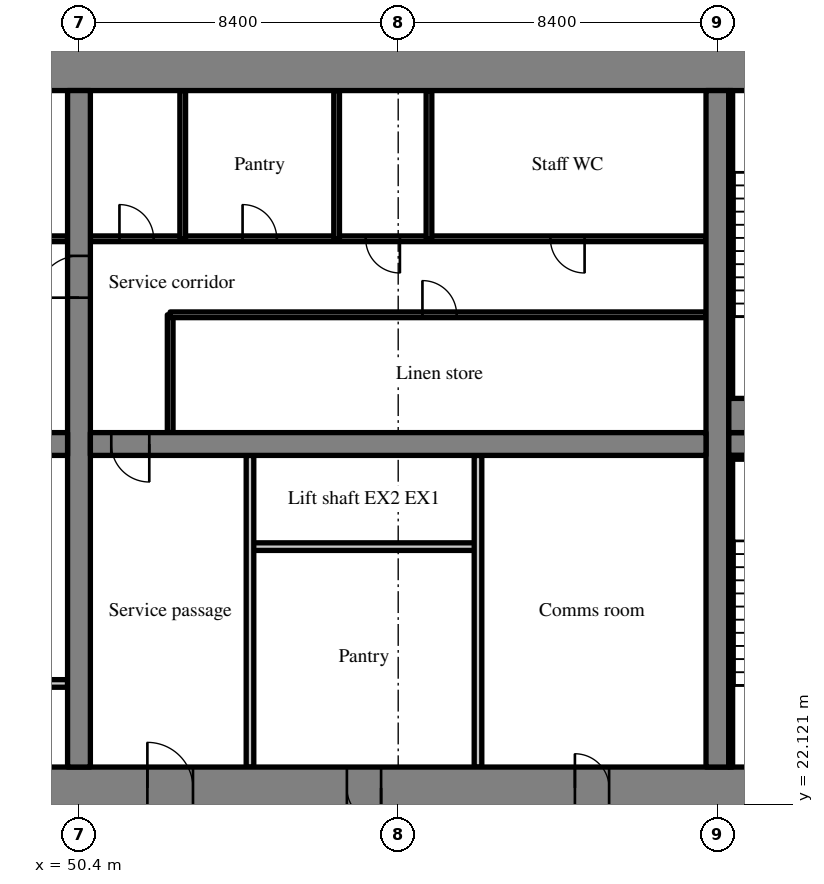
"""IFC4 building model, lengths in metres.
Left out: names, types, materials, properties, quantities, classifications, styles, units other than length and angle.
Written with IfcOpenShell. Run it as: python <this file> out.ifc"""

import sys

from ifc_helpers import new_model, si_unit, direction, frame, frame_2d, origin, place, context, subcontext, project, spatial, rectangle, extrude, source, transform, mapped, element, fill, save


model = new_model("IFC4")
c1 = context("Model", 3, precision=1e-05, world=origin(), true_north=direction((0.0, 1.0)))
c2 = subcontext(c1, "Body", "Model", "MODEL_VIEW")
j1 = project(units=[si_unit("LENGTHUNIT", "METRE"), si_unit("PLANEANGLEUNIT", "RADIAN")], contexts=[c1])
p1 = place(None, origin())
s1 = spatial("IfcSite", under=j1, at=p1, CompositionType="ELEMENT")
p2 = place(p1, origin())
s2 = spatial("IfcBuilding", under=s1, at=p2, CompositionType="ELEMENT")
p3 = place(p2, frame((0.0, 0.0, 27.8)))
s3 = spatial("IfcBuildingStorey", under=s2, at=p3, CompositionType="ELEMENT", Elevation=27.8)
m1 = source(origin(), c2, "Body", "SweptSolid", [
    extrude(rectangle(XDim=50.4, YDim=1.1, at=frame_2d((25.2, 0.0))), origin(), (0.0, 0.0, 1.0), 3.52),
])
p4 = place(p3, frame((25.2, 22.55, 0.0), z_axis=(0.0, 0.0, 1.0), x_axis=(1.0, 0.0, 0.0)))
e1 = element("IfcWall", 1, at=p4, inside=s3, PredefinedType="SHEAR", context=c2, shape_type="MappedRepresentation", body=[
    mapped(m1, transform((0.0, 0.0, 0.0), scale=1.0)),
])
m2 = source(origin(), c2, "Body", "SweptSolid", [
    extrude(rectangle(XDim=1.8, YDim=2.1, at=frame_2d((0.9, 1.05))), frame((0.0, 0.56, 0.0), z_axis=(0.0, -1.0, 0.0), x_axis=(1.0, 0.0, 0.0)), (0.0, 0.0, 1.0), 1.12),
])
p5 = place(p4, frame((15.9, 0.0, 0.0)))
e2 = element("IfcOpeningElement", 2, at=p5, cuts=e1, PredefinedType="OPENING", context=c2, shape_type="MappedRepresentation", body=[
    mapped(m2, transform((0.0, 0.0, 0.0), scale=1.0)),
])
m3 = source(origin(), c2, "Body", "SweptSolid", [
    extrude(rectangle(XDim=1.2, YDim=2.1, at=frame_2d((0.6, 1.05))), frame((0.0, 0.56, 0.0), z_axis=(0.0, -1.0, 0.0), x_axis=(1.0, 0.0, 0.0)), (0.0, 0.0, 1.0), 1.12),
])
p6 = place(p4, frame((27.0, 0.0, 0.0)))
e3 = element("IfcOpeningElement", 3, at=p6, cuts=e1, PredefinedType="OPENING", context=c2, shape_type="MappedRepresentation", body=[
    mapped(m3, transform((0.0, 0.0, 0.0), scale=1.0)),
])
m4 = source(origin(), c2, "Body", "SweptSolid", [
    extrude(rectangle(XDim=0.9, YDim=2.1, at=frame_2d((0.45, 1.05))), frame((0.0, 0.56, 0.0), z_axis=(0.0, -1.0, 0.0), x_axis=(1.0, 0.0, 0.0)), (0.0, 0.0, 1.0), 1.12),
])
p7 = place(p4, frame((32.25, 0.0, 0.0)))
e4 = element("IfcOpeningElement", 4, at=p7, cuts=e1, PredefinedType="OPENING", context=c2, shape_type="MappedRepresentation", body=[
    mapped(m4, transform((0.0, 0.0, 0.0), scale=1.0)),
])
p8 = place(p4, frame((38.25, 0.0, 0.0)))
e5 = element("IfcOpeningElement", 5, at=p8, cuts=e1, PredefinedType="OPENING", context=c2, shape_type="MappedRepresentation", body=[
    mapped(m4, transform((0.0, 0.0, 0.0), scale=1.0)),
])
p9 = place(p4, frame((6.425, 0.0, 0.0)))
e6 = element("IfcOpeningElement", 6, at=p9, cuts=e1, PredefinedType="OPENING", context=c2, shape_type="MappedRepresentation", body=[
    mapped(m3, transform((0.0, 0.0, 0.0), scale=1.0)),
])
p10 = place(p4, frame((47.675, 0.0, 0.0)))
e7 = element("IfcOpeningElement", 7, at=p10, cuts=e1, PredefinedType="OPENING", context=c2, shape_type="MappedRepresentation", body=[
    mapped(m3, transform((0.0, 0.0, 0.0), scale=1.0)),
])
p11 = place(p3, frame((25.2, 41.45, 0.0), z_axis=(0.0, 0.0, 1.0), x_axis=(1.0, 0.0, 0.0)))
e8 = element("IfcWall", 8, at=p11, inside=s3, PredefinedType="SHEAR", context=c2, shape_type="MappedRepresentation", body=[
    mapped(m1, transform((0.0, 0.0, 0.0), scale=1.0)),
])
m5 = source(origin(), c2, "Body", "SweptSolid", [
    extrude(rectangle(XDim=17.8, YDim=0.6, at=frame_2d((8.9, 0.0))), origin(), (0.0, 0.0, 1.0), 3.52),
])
p12 = place(p3, frame((50.4, 23.1, 0.0), z_axis=(0.0, 0.0, 1.0), x_axis=(0.0, 1.0, 0.0)))
e9 = element("IfcWall", 9, at=p12, inside=s3, PredefinedType="SHEAR", context=c2, shape_type="MappedRepresentation", body=[
    mapped(m5, transform((0.0, 0.0, 0.0), scale=1.0)),
])
m6 = source(origin(), c2, "Body", "SweptSolid", [
    extrude(rectangle(XDim=1.1, YDim=2.1, at=frame_2d((0.55, 1.05))), frame((0.0, 0.31, 0.0), z_axis=(0.0, -1.0, 0.0), x_axis=(1.0, 0.0, 0.0)), (0.0, 0.0, 1.0), 0.62),
])
p13 = place(p12, frame((12.35, 0.0, 0.0)))
e10 = element("IfcOpeningElement", 10, at=p13, cuts=e9, PredefinedType="OPENING", context=c2, shape_type="MappedRepresentation", body=[
    mapped(m6, transform((0.0, 0.0, 0.0), scale=1.0)),
])
p14 = place(p3, frame((67.2, 23.1, 0.0), z_axis=(0.0, 0.0, 1.0), x_axis=(0.0, 1.0, 0.0)))
e11 = element("IfcWall", 11, at=p14, inside=s3, PredefinedType="SHEAR", context=c2, shape_type="MappedRepresentation", body=[
    mapped(m5, transform((0.0, 0.0, 0.0), scale=1.0)),
])
m7 = source(origin(), c2, "Body", "SweptSolid", [
    extrude(rectangle(XDim=16.2, YDim=0.6, at=frame_2d((8.1, 0.0))), origin(), (0.0, 0.0, 1.0), 3.52),
])
p15 = place(p3, frame((33.9, 31.6, 0.0), z_axis=(0.0, 0.0, 1.0), x_axis=(1.0, 0.0, 0.0)))
e12 = element("IfcWall", 12, at=p15, inside=s3, PredefinedType="SHEAR", context=c2, shape_type="MappedRepresentation", body=[
    mapped(m7, transform((0.0, 0.0, 0.0), scale=1.0)),
])
m8 = source(origin(), c2, "Body", "SweptSolid", [
    extrude(rectangle(XDim=1.0, YDim=2.1, at=frame_2d((0.5, 1.05))), frame((0.0, 0.31, 0.0), z_axis=(0.0, -1.0, 0.0), x_axis=(1.0, 0.0, 0.0)), (0.0, 0.0, 1.0), 0.62),
])
p16 = place(p15, frame((14.65, 0.0, 0.0)))
e13 = element("IfcOpeningElement", 13, at=p16, cuts=e12, PredefinedType="OPENING", context=c2, shape_type="MappedRepresentation", body=[
    mapped(m8, transform((0.0, 0.0, 0.0), scale=1.0)),
])
m9 = source(origin(), c2, "Body", "SweptSolid", [
    extrude(rectangle(XDim=16.2, YDim=0.6, at=frame_2d((8.1, 0.0))), origin(), (0.0, 0.0, 1.0), 3.52),
])
p17 = place(p3, frame((50.7, 31.6, 0.0), z_axis=(0.0, 0.0, 1.0), x_axis=(1.0, 0.0, 0.0)))
e14 = element("IfcWall", 14, at=p17, inside=s3, PredefinedType="SHEAR", context=c2, shape_type="MappedRepresentation", body=[
    mapped(m9, transform((0.0, 0.0, 0.0), scale=1.0)),
])
p18 = place(p17, frame((0.55, 0.0, 0.0)))
e15 = element("IfcOpeningElement", 15, at=p18, cuts=e14, PredefinedType="OPENING", context=c2, shape_type="MappedRepresentation", body=[
    mapped(m8, transform((0.0, 0.0, 0.0), scale=1.0)),
])
m10 = source(origin(), c2, "Body", "SweptSolid", [
    extrude(rectangle(XDim=7.0, YDim=0.6, at=frame_2d((3.5, 0.0))), origin(), (0.0, 0.0, 1.0), 3.52),
])
p19 = place(p3, frame((67.5, 31.6, 0.0), z_axis=(0.0, 0.0, 1.0), x_axis=(1.0, 0.0, 0.0)))
e16 = element("IfcWall", 16, at=p19, inside=s3, PredefinedType="SHEAR", context=c2, shape_type="MappedRepresentation", body=[
    mapped(m10, transform((0.0, 0.0, 0.0), scale=1.0)),
])
p20 = place(p19, frame((5.425, 0.0, 0.0)))
e17 = element("IfcOpeningElement", 17, at=p20, cuts=e16, PredefinedType="OPENING", context=c2, shape_type="MappedRepresentation", body=[
    mapped(m6, transform((0.0, 0.0, 0.0), scale=1.0)),
])
m11 = source(origin(), c2, "Body", "SweptSolid", [
    extrude(rectangle(XDim=6.0, YDim=0.2, at=frame_2d((3.0, 0.0))), origin(), (0.0, 0.0, 1.0), 3.52),
])
p21 = place(p3, frame((44.1, 25.3, 0.0), z_axis=(0.0, 0.0, 1.0), x_axis=(1.0, 0.0, 0.0)))
e18 = element("IfcWall", 18, at=p21, inside=s3, PredefinedType="SOLIDWALL", context=c2, shape_type="MappedRepresentation", body=[
    mapped(m11, transform((0.0, 0.0, 0.0), scale=1.0)),
])
m12 = source(origin(), c2, "Body", "SweptSolid", [
    extrude(rectangle(XDim=1.1, YDim=2.1, at=frame_2d((0.55, 1.05))), frame((0.0, 0.11, 0.0), z_axis=(0.0, -1.0, 0.0), x_axis=(1.0, 0.0, 0.0)), (0.0, 0.0, 1.0), 0.22),
])
p22 = place(p21, frame((0.95, 0.0, 0.0)))
e19 = element("IfcOpeningElement", 19, at=p22, cuts=e18, PredefinedType="OPENING", context=c2, shape_type="MappedRepresentation", body=[
    mapped(m12, transform((0.0, 0.0, 0.0), scale=1.0)),
])
p23 = place(p21, frame((3.95, 0.0, 0.0)))
e20 = element("IfcOpeningElement", 20, at=p23, cuts=e18, PredefinedType="OPENING", context=c2, shape_type="MappedRepresentation", body=[
    mapped(m12, transform((0.0, 0.0, 0.0), scale=1.0)),
])
m13 = source(origin(), c2, "Body", "SweptSolid", [
    extrude(rectangle(XDim=16.2, YDim=0.15, at=frame_2d((8.1, 0.0))), origin(), (0.0, 0.0, 1.0), 3.52),
])
p24 = place(p3, frame((33.9, 37.0, 0.0), z_axis=(0.0, 0.0, 1.0), x_axis=(1.0, 0.0, 0.0)))
e21 = element("IfcWall", 21, at=p24, inside=s3, PredefinedType="PARTITIONING", context=c2, shape_type="MappedRepresentation", body=[
    mapped(m13, transform((0.0, 0.0, 0.0), scale=1.0)),
])
m14 = source(origin(), c2, "Body", "SweptSolid", [
    extrude(rectangle(XDim=0.9, YDim=2.1, at=frame_2d((0.45, 1.05))), frame((0.0, 0.085, 0.0), z_axis=(0.0, -1.0, 0.0), x_axis=(1.0, 0.0, 0.0)), (0.0, 0.0, 1.0), 0.17),
])
p25 = place(p24, frame((1.575, 0.0, 0.0)))
e22 = element("IfcOpeningElement", 22, at=p25, cuts=e21, PredefinedType="OPENING", context=c2, shape_type="MappedRepresentation", body=[
    mapped(m14, transform((0.0, 0.0, 0.0), scale=1.0)),
])
p26 = place(p24, frame((7.245, 0.0, 0.0)))
e23 = element("IfcOpeningElement", 23, at=p26, cuts=e21, PredefinedType="OPENING", context=c2, shape_type="MappedRepresentation", body=[
    mapped(m14, transform((0.0, 0.0, 0.0), scale=1.0)),
])
p27 = place(p24, frame((12.105, 0.0, 0.0)))
e24 = element("IfcOpeningElement", 24, at=p27, cuts=e21, PredefinedType="OPENING", context=c2, shape_type="MappedRepresentation", body=[
    mapped(m14, transform((0.0, 0.0, 0.0), scale=1.0)),
])
p28 = place(p24, frame((14.535, 0.0, 0.0)))
e25 = element("IfcOpeningElement", 25, at=p28, cuts=e21, PredefinedType="OPENING", context=c2, shape_type="MappedRepresentation", body=[
    mapped(m14, transform((0.0, 0.0, 0.0), scale=1.0)),
])
p29 = place(p3, frame((60.9, 28.9, 0.0), z_axis=(0.0, 0.0, 1.0), x_axis=(-1.0, 0.0, 0.0)))
e26 = element("IfcWall", 26, at=p29, inside=s3, PredefinedType="SOLIDWALL", context=c2, shape_type="MappedRepresentation", body=[
    mapped(m11, transform((0.0, 0.0, 0.0), scale=1.0)),
])
m15 = source(origin(), c2, "Body", "SweptSolid", [
    extrude(rectangle(XDim=8.2, YDim=0.2, at=frame_2d((4.1, 0.0))), origin(), (0.0, 0.0, 1.0), 3.52),
])
for number, where, z_axis, x_axis in (
    (27, (54.9, 23.1, 0.0), (0.0, 0.0, 1.0), (0.0, 1.0, 0.0)),
    (28, (60.9, 23.1, 0.0), (0.0, 0.0, 1.0), (0.0, 1.0, 0.0)),
):
    element("IfcWall", number, at=place(p3, frame(where, z_axis=z_axis, x_axis=x_axis)), inside=s3, PredefinedType="PARTITIONING", context=c2, shape_type="MappedRepresentation", body=[
        mapped(m15, transform((0.0, 0.0, 0.0), scale=1.0)),
    ])
m16 = source(origin(), c2, "Body", "SweptSolid", [
    extrude(rectangle(XDim=3.1, YDim=0.15, at=frame_2d((1.55, 0.0))), origin(), (0.0, 0.0, 1.0), 3.52),
])
p30 = place(p3, frame((52.8, 31.9, 0.0), z_axis=(0.0, 0.0, 1.0), x_axis=(0.0, 1.0, 0.0)))
e29 = element("IfcWall", 29, at=p30, inside=s3, PredefinedType="PARTITIONING", context=c2, shape_type="MappedRepresentation", body=[
    mapped(m16, transform((0.0, 0.0, 0.0), scale=1.0)),
])
m17 = source(origin(), c2, "Body", "SweptSolid", [
    extrude(rectangle(XDim=14.1, YDim=0.15, at=frame_2d((7.05, 0.0))), origin(), (0.0, 0.0, 1.0), 3.52),
])
p31 = place(p3, frame((66.9, 35.0, 0.0), z_axis=(0.0, 0.0, 1.0), x_axis=(-1.0, 0.0, 0.0)))
e30 = element("IfcWall", 30, at=p31, inside=s3, PredefinedType="PARTITIONING", context=c2, shape_type="MappedRepresentation", body=[
    mapped(m17, transform((0.0, 0.0, 0.0), scale=1.0)),
])
p32 = place(p31, frame((6.562, 0.0, 0.0)))
e31 = element("IfcOpeningElement", 31, at=p32, cuts=e30, PredefinedType="OPENING", context=c2, shape_type="MappedRepresentation", body=[
    mapped(m14, transform((0.0, 0.0, 0.0), scale=1.0)),
])
m18 = source(origin(), c2, "Body", "SweptSolid", [
    extrude(rectangle(XDim=16.2, YDim=0.15, at=frame_2d((8.1, 0.0))), origin(), (0.0, 0.0, 1.0), 3.52),
])
p33 = place(p3, frame((66.9, 37.0, 0.0), z_axis=(0.0, 0.0, 1.0), x_axis=(-1.0, 0.0, 0.0)))
e32 = element("IfcWall", 32, at=p33, inside=s3, PredefinedType="PARTITIONING", context=c2, shape_type="MappedRepresentation", body=[
    mapped(m18, transform((0.0, 0.0, 0.0), scale=1.0)),
])
p34 = place(p33, frame((3.195, 0.0, 0.0)))
e33 = element("IfcOpeningElement", 33, at=p34, cuts=e32, PredefinedType="OPENING", context=c2, shape_type="MappedRepresentation", body=[
    mapped(m14, transform((0.0, 0.0, 0.0), scale=1.0)),
])
p35 = place(p33, frame((8.055, 0.0, 0.0)))
e34 = element("IfcOpeningElement", 34, at=p35, cuts=e32, PredefinedType="OPENING", context=c2, shape_type="MappedRepresentation", body=[
    mapped(m14, transform((0.0, 0.0, 0.0), scale=1.0)),
])
p36 = place(p33, frame((11.295, 0.0, 0.0)))
e35 = element("IfcOpeningElement", 35, at=p36, cuts=e32, PredefinedType="OPENING", context=c2, shape_type="MappedRepresentation", body=[
    mapped(m14, transform((0.0, 0.0, 0.0), scale=1.0)),
])
p37 = place(p33, frame((14.535, 0.0, 0.0)))
e36 = element("IfcOpeningElement", 36, at=p37, cuts=e32, PredefinedType="OPENING", context=c2, shape_type="MappedRepresentation", body=[
    mapped(m14, transform((0.0, 0.0, 0.0), scale=1.0)),
])
m19 = source(origin(), c2, "Body", "SweptSolid", [
    extrude(rectangle(XDim=3.9, YDim=0.15, at=frame_2d((1.95, 0.0))), origin(), (0.0, 0.0, 1.0), 3.52),
])
for number, where, z_axis, x_axis in (
    (37, (59.61, 37.0, 0.0), (0.0, 0.0, 1.0), (0.0, 1.0, 0.0)),
    (38, (57.18, 37.0, 0.0), (0.0, 0.0, 1.0), (0.0, 1.0, 0.0)),
    (39, (53.13, 37.0, 0.0), (0.0, 0.0, 1.0), (0.0, 1.0, 0.0)),
):
    element("IfcWall", number, at=place(p3, frame(where, z_axis=z_axis, x_axis=x_axis)), inside=s3, PredefinedType="PARTITIONING", context=c2, shape_type="MappedRepresentation", body=[
        mapped(m19, transform((0.0, 0.0, 0.0), scale=1.0)),
    ])
m20 = source(origin(), c2, "Body", "SweptSolid", [
    extrude(rectangle(XDim=4.75, YDim=0.1, at=frame_2d((2.375, 0.0))), origin(), (0.0, 0.0, 1.0), 3.52),
])
p38 = place(p3, frame((67.5, 31.25, 0.0), z_axis=(0.0, 0.0, 1.0), x_axis=(1.0, 0.0, 0.0)))
e40 = element("IfcWall", 40, at=p38, inside=s3, PredefinedType="SOLIDWALL", context=c2, shape_type="MappedRepresentation", body=[
    mapped(m20, transform((0.0, 0.0, 0.0), scale=1.0)),
])
m21 = source(origin(), c2, "Body", "SweptSolid", [
    extrude(rectangle(XDim=8.1, YDim=0.1, at=frame_2d((4.05, 0.0))), origin(), (0.0, 0.0, 1.0), 3.52),
])
p39 = place(p3, frame((67.55, 23.1, 0.0), z_axis=(0.0, 0.0, 1.0), x_axis=(0.0, 1.0, 0.0)))
e41 = element("IfcWall", 41, at=p39, inside=s3, PredefinedType="SOLIDWALL", context=c2, shape_type="MappedRepresentation", body=[
    mapped(m21, transform((0.0, 0.0, 0.0), scale=1.0)),
])
m22 = source(origin(), c2, "Body", "SweptSolid", [
    extrude(rectangle(XDim=4.75, YDim=0.9, at=frame_2d((2.375, 0.0))), origin(), (0.0, 0.0, 1.0), 3.52),
])
p40 = place(p3, frame((67.5, 32.35, 0.0), z_axis=(0.0, 0.0, 1.0), x_axis=(1.0, 0.0, 0.0)))
e42 = element("IfcWall", 42, at=p40, inside=s3, PredefinedType="SOLIDWALL", context=c2, shape_type="MappedRepresentation", body=[
    mapped(m22, transform((0.0, 0.0, 0.0), scale=1.0)),
])
p41 = place(p3, frame((67.55, 32.8, 0.0), z_axis=(0.0, 0.0, 1.0), x_axis=(0.0, 1.0, 0.0)))
e43 = element("IfcWall", 43, at=p41, inside=s3, PredefinedType="SOLIDWALL", context=c2, shape_type="MappedRepresentation", body=[
    mapped(m21, transform((0.0, 0.0, 0.0), scale=1.0)),
])
m23 = source(origin(), c2, "Body", "SweptSolid", [
    extrude(rectangle(XDim=1.2, YDim=2.1, at=frame_2d((0.6, 1.05))), frame((0.0, 0.325, 0.0), z_axis=(0.0, -1.0, 0.0), x_axis=(1.0, 0.0, 0.0)), (0.0, 0.0, 1.0), 0.05),
])
p42 = place(p6, origin())
e44 = element("IfcDoor", 44, at=p42, inside=s3, OperationType="SINGLE_SWING_LEFT", PredefinedType="DOOR", context=c2, shape_type="MappedRepresentation", body=[
    mapped(m23, transform((0.0, 0.0, 0.0), scale=1.0)),
])
fill(e3, e44)
m24 = source(origin(), c2, "Body", "SweptSolid", [
    extrude(rectangle(XDim=1.0, YDim=2.1, at=frame_2d((0.5, 1.05))), frame((0.0, 0.025, 0.0), z_axis=(0.0, -1.0, 0.0), x_axis=(1.0, 0.0, 0.0)), (0.0, 0.0, 1.0), 0.05),
])
p43 = place(p18, origin())
e45 = element("IfcDoor", 45, at=p43, inside=s3, OperationType="SINGLE_SWING_RIGHT", PredefinedType="DOOR", context=c2, shape_type="MappedRepresentation", body=[
    mapped(m24, transform((0.0, 0.0, 0.0), scale=1.0)),
])
fill(e15, e45)
m25 = source(origin(), c2, "Body", "SweptSolid", [
    extrude(rectangle(XDim=0.9, YDim=2.1, at=frame_2d((0.45, 1.05))), frame((0.0, 0.325, 0.0), z_axis=(0.0, -1.0, 0.0), x_axis=(1.0, 0.0, 0.0)), (0.0, 0.0, 1.0), 0.05),
])
p44 = place(p7, origin())
e46 = element("IfcDoor", 46, at=p44, inside=s3, OperationType="SINGLE_SWING_RIGHT", PredefinedType="DOOR", context=c2, shape_type="MappedRepresentation", body=[
    mapped(m25, transform((0.0, 0.0, 0.0), scale=1.0)),
])
fill(e4, e46)
p45 = place(p8, origin())
e47 = element("IfcDoor", 47, at=p45, inside=s3, OperationType="SINGLE_SWING_LEFT", PredefinedType="DOOR", context=c2, shape_type="MappedRepresentation", body=[
    mapped(m25, transform((0.0, 0.0, 0.0), scale=1.0)),
])
fill(e5, e47)
m26 = source(origin(), c2, "Body", "SweptSolid", [
    extrude(rectangle(XDim=0.9, YDim=2.1, at=frame_2d((0.45, 1.05))), frame((0.0, 0.025, 0.0), z_axis=(0.0, -1.0, 0.0), x_axis=(1.0, 0.0, 0.0)), (0.0, 0.0, 1.0), 0.05),
])
p46 = place(p32, origin())
e48 = element("IfcDoor", 48, at=p46, inside=s3, OperationType="SINGLE_SWING_RIGHT", PredefinedType="DOOR", context=c2, shape_type="MappedRepresentation", body=[
    mapped(m26, transform((0.0, 0.0, 0.0), scale=1.0)),
])
fill(e31, e48)
p47 = place(p34, origin())
e49 = element("IfcDoor", 49, at=p47, inside=s3, OperationType="SINGLE_SWING_LEFT", PredefinedType="DOOR", context=c2, shape_type="MappedRepresentation", body=[
    mapped(m26, transform((0.0, 0.0, 0.0), scale=1.0)),
])
fill(e33, e49)
p48 = place(p35, origin())
e50 = element("IfcDoor", 50, at=p48, inside=s3, OperationType="SINGLE_SWING_LEFT", PredefinedType="DOOR", context=c2, shape_type="MappedRepresentation", body=[
    mapped(m26, transform((0.0, 0.0, 0.0), scale=1.0)),
])
fill(e34, e50)
p49 = place(p36, origin())
e51 = element("IfcDoor", 51, at=p49, inside=s3, OperationType="SINGLE_SWING_RIGHT", PredefinedType="DOOR", context=c2, shape_type="MappedRepresentation", body=[
    mapped(m26, transform((0.0, 0.0, 0.0), scale=1.0)),
])
fill(e35, e51)
p50 = place(p37, origin())
e52 = element("IfcDoor", 52, at=p50, inside=s3, OperationType="SINGLE_SWING_RIGHT", PredefinedType="DOOR", context=c2, shape_type="MappedRepresentation", body=[
    mapped(m26, transform((0.0, 0.0, 0.0), scale=1.0)),
])
fill(e36, e52)
m27 = source(origin(), c2, "Body", "SweptSolid", [
    extrude(rectangle(XDim=1.1, YDim=2.1, at=frame_2d((0.55, 1.05))), frame((0.0, 0.025, 0.0), z_axis=(0.0, -1.0, 0.0), x_axis=(1.0, 0.0, 0.0)), (0.0, 0.0, 1.0), 0.05),
])
p51 = place(p13, origin())
e53 = element("IfcDoor", 53, at=p51, inside=s3, OperationType="SINGLE_SWING_LEFT", PredefinedType="DOOR", context=c2, shape_type="MappedRepresentation", body=[
    mapped(m27, transform((0.0, 0.0, 0.0), scale=1.0)),
])
fill(e10, e53)
save(model, sys.argv[1])
